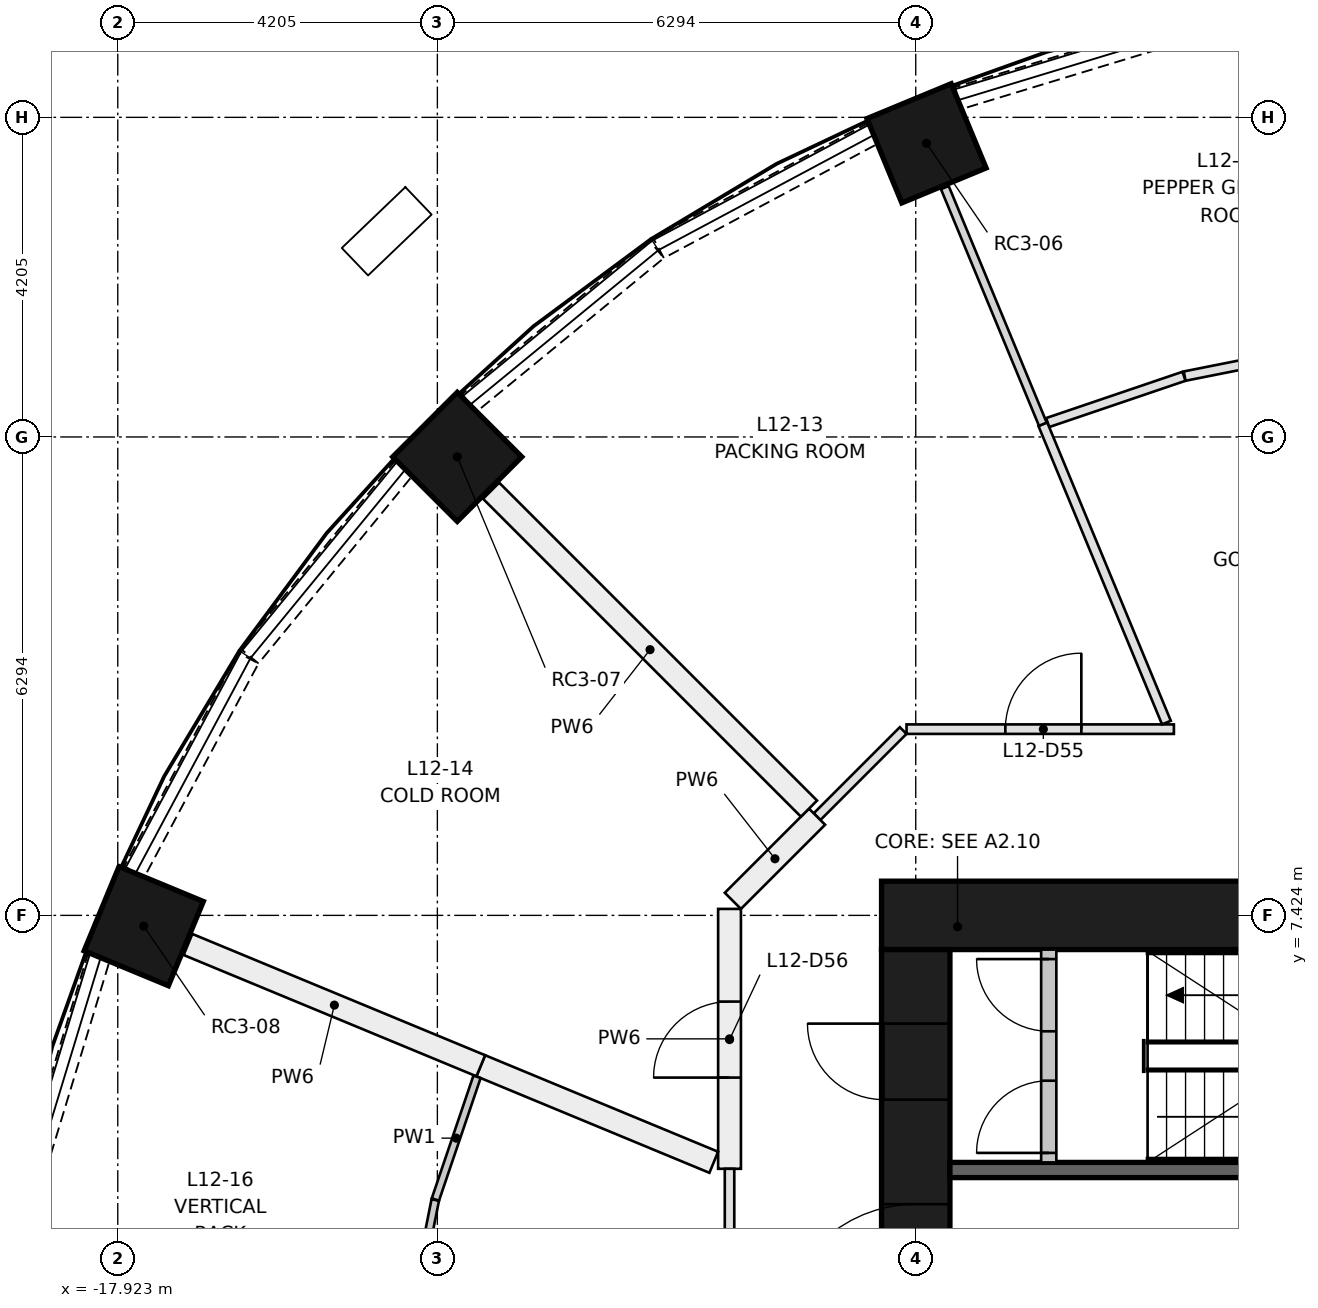
"""IFC4 building model, lengths in metres.
Left out: names, types, materials, properties, quantities, classifications, styles, units other than length and angle.
Written with IfcOpenShell. Run it as: python <this file> out.ifc"""

import sys

from ifc_helpers import new_model, si_unit, direction, frame, frame_2d, origin, origin_2d, place, context, subcontext, project, spatial, rectangle, extrude, element, fill, save


model = new_model("IFC4")
c1 = context("Model", 3, precision=1e-05, world=origin(), true_north=direction((0.0, 1.0)))
c2 = subcontext(c1, "Body", "Model", "MODEL_VIEW")
j1 = project(units=[si_unit("LENGTHUNIT", "METRE"), si_unit("PLANEANGLEUNIT", "RADIAN")], contexts=[c1])
p1 = place(None, origin())
s1 = spatial("IfcSite", under=j1, at=p1, CompositionType="ELEMENT")
p2 = place(p1, origin())
s2 = spatial("IfcBuilding", under=s1, at=p2, CompositionType="ELEMENT")
p3 = place(p2, frame((0.0, 0.0, 48.1)))
s3 = spatial("IfcBuildingStorey", under=s2, at=p3, CompositionType="ELEMENT", Elevation=48.1)
for number, where, z_axis, x_axis in (
    (1, (-7.282, 17.582, 0.0), (0.0, 0.0, 1.0), (-0.383, 0.924, 0.0)),
    (2, (-13.456, 13.456, 0.0), (0.0, 0.0, 1.0), (-0.707, 0.707, 0.0)),
    (3, (-17.582, 7.282, 0.0), (0.0, 0.0, 1.0), (-0.924, 0.383, 0.0)),
):
    element("IfcColumn", number, at=place(p3, frame(where, z_axis=z_axis, x_axis=x_axis)), inside=s3, PredefinedType="COLUMN", context=c2, shape_type="SweptSolid", body=[
        extrude(rectangle(XDim=1.2, YDim=1.2, at=origin_2d()), origin(), (0.0, 0.0, 1.0), 3.65),
    ])
p4 = place(p3, frame((-7.874, 7.424, 0.0), z_axis=(0.0, 0.0, 1.0), x_axis=(1.0, 0.0, 0.0)))
e4 = element("IfcWall", 4, at=p4, inside=s3, PredefinedType="SHEAR", context=c2, shape_type="SweptSolid", body=[
    extrude(rectangle(XDim=15.748, YDim=0.9, at=frame_2d((7.874, 0.0))), origin(), (0.0, 0.0, 1.0), 3.65),
])
p5 = place(p3, frame((-7.424, -6.974, 0.0), z_axis=(0.0, 0.0, 1.0), x_axis=(0.0, 1.0, 0.0)))
e5 = element("IfcWall", 5, at=p5, inside=s3, PredefinedType="SHEAR", context=c2, shape_type="SweptSolid", body=[
    extrude(rectangle(XDim=13.948, YDim=0.9, at=frame_2d((6.974, 0.0))), origin(), (0.0, 0.0, 1.0), 3.65),
])
p6 = place(p5, frame((6.474, 0.0, 0.0)))
e6 = element("IfcOpeningElement", 6, at=p6, cuts=e5, PredefinedType="OPENING", context=c2, shape_type="SweptSolid", body=[
    extrude(rectangle(XDim=1.0, YDim=2.1, at=frame_2d((0.5, 1.05))), frame((0.0, 0.46, 0.0), z_axis=(0.0, -1.0, 0.0), x_axis=(1.0, 0.0, 0.0)), (0.0, 0.0, 1.0), 0.92),
])
p7 = place(p5, frame((3.35, 0.0, 0.0)))
e7 = element("IfcOpeningElement", 7, at=p7, cuts=e5, PredefinedType="OPENING", context=c2, shape_type="SweptSolid", body=[
    extrude(rectangle(XDim=1.8, YDim=2.1, at=frame_2d((0.9, 1.05))), frame((0.0, 0.46, 0.0), z_axis=(0.0, -1.0, 0.0), x_axis=(1.0, 0.0, 0.0)), (0.0, 0.0, 1.0), 0.92),
])
p8 = place(p5, frame((8.799, 0.0, 0.0)))
e8 = element("IfcOpeningElement", 8, at=p8, cuts=e5, PredefinedType="OPENING", context=c2, shape_type="SweptSolid", body=[
    extrude(rectangle(XDim=1.8, YDim=2.1, at=frame_2d((0.9, 1.05))), frame((0.0, 0.46, 0.0), z_axis=(0.0, -1.0, 0.0), x_axis=(1.0, 0.0, 0.0)), (0.0, 0.0, 1.0), 0.92),
])
p9 = place(p5, frame((11.974, 0.0, 0.0)))
e9 = element("IfcOpeningElement", 9, at=p9, cuts=e5, PredefinedType="OPENING", context=c2, shape_type="SweptSolid", body=[
    extrude(rectangle(XDim=1.0, YDim=2.1, at=frame_2d((0.5, 1.05))), frame((0.0, 0.46, 0.0), z_axis=(0.0, -1.0, 0.0), x_axis=(1.0, 0.0, 0.0)), (0.0, 0.0, 1.0), 0.92),
])
p10 = place(p3, frame((-6.974, 4.074, 0.0), z_axis=(0.0, 0.0, 1.0), x_axis=(1.0, 0.0, 0.0)))
e10 = element("IfcWall", 10, at=p10, inside=s3, PredefinedType="SHEAR", context=c2, shape_type="SweptSolid", body=[
    extrude(rectangle(XDim=6.974, YDim=0.2, at=frame_2d((3.487, 0.0))), origin(), (0.0, 0.0, 1.0), 3.3),
])
p11 = place(p3, frame((-5.674, 4.174, 0.0), z_axis=(0.0, 0.0, 1.0), x_axis=(0.0, 1.0, 0.0)))
e11 = element("IfcWall", 11, at=p11, inside=s3, PredefinedType="PARTITIONING", context=c2, shape_type="SweptSolid", body=[
    extrude(rectangle(XDim=2.8, YDim=0.2, at=frame_2d((1.4, 0.0))), origin(), (0.0, 0.0, 1.0), 3.3),
])
p12 = place(p11, frame((0.125, 0.0, 0.0)))
e12 = element("IfcOpeningElement", 12, at=p12, cuts=e11, PredefinedType="OPENING", context=c2, shape_type="SweptSolid", body=[
    extrude(rectangle(XDim=0.95, YDim=2.1, at=frame_2d((0.475, 1.05))), frame((0.0, 0.11, 0.0), z_axis=(0.0, -1.0, 0.0), x_axis=(1.0, 0.0, 0.0)), (0.0, 0.0, 1.0), 0.22),
])
p13 = place(p11, frame((1.725, 0.0, 0.0)))
e13 = element("IfcOpeningElement", 13, at=p13, cuts=e11, PredefinedType="OPENING", context=c2, shape_type="SweptSolid", body=[
    extrude(rectangle(XDim=0.95, YDim=2.1, at=frame_2d((0.475, 1.05))), frame((0.0, 0.11, 0.0), z_axis=(0.0, -1.0, 0.0), x_axis=(1.0, 0.0, 0.0)), (0.0, 0.0, 1.0), 0.22),
])
p14 = place(p3, frame((-3.814, 19.102, 0.0), z_axis=(0.0, 0.0, 1.0), x_axis=(-0.956849017819, -0.290585541792, 0.0)))
e14 = element("IfcWall", 14, at=p14, inside=s3, PredefinedType="SOLIDWALL", context=c2, shape_type="SweptSolid", body=[
    extrude(rectangle(XDim=3.188, YDim=0.3, at=frame_2d((1.594, 0.0))), origin(), (0.0, 0.0, 1.0), 0.9),
])
p15 = place(p3, frame((-7.998, 17.706, 0.0), z_axis=(0.0, 0.0, 1.0), x_axis=(-0.881994263934, -0.471260138764, 0.0)))
e15 = element("IfcWall", 15, at=p15, inside=s3, PredefinedType="SOLIDWALL", context=c2, shape_type="SweptSolid", body=[
    extrude(rectangle(XDim=3.187, YDim=0.3, at=frame_2d((1.593, 0.0))), origin(), (0.0, 0.0, 1.0), 0.9),
])
for number, where, z_axis, x_axis in (
    (16, (-10.833, 16.188, 0.0), (0.0, 0.0, 1.0), (-0.773, -0.634, 0.0)),
    (17, (-14.166, 13.298, 0.0), (0.0, 0.0, 1.0), (-0.634, -0.773, 0.0)),
):
    element("IfcWall", number, at=place(p3, frame(where, z_axis=z_axis, x_axis=x_axis)), inside=s3, PredefinedType="SOLIDWALL", context=c2, shape_type="SweptSolid", body=[
        extrude(rectangle(XDim=3.188, YDim=0.3, at=frame_2d((1.594, 0.0))), origin(), (0.0, 0.0, 1.0), 0.9),
    ])
p16 = place(p3, frame((-16.204, 10.809, 0.0), z_axis=(0.0, 0.0, 1.0), x_axis=(-0.471260138764, -0.881994263934, 0.0)))
e18 = element("IfcWall", 18, at=p16, inside=s3, PredefinedType="SOLIDWALL", context=c2, shape_type="SweptSolid", body=[
    extrude(rectangle(XDim=3.187, YDim=0.3, at=frame_2d((1.593, 0.0))), origin(), (0.0, 0.0, 1.0), 0.9),
])
p17 = place(p3, frame((-18.175, 6.865, 0.0), z_axis=(0.0, 0.0, 1.0), x_axis=(-0.290585541792, -0.956849017819, 0.0)))
e19 = element("IfcWall", 19, at=p17, inside=s3, PredefinedType="SOLIDWALL", context=c2, shape_type="SweptSolid", body=[
    extrude(rectangle(XDim=3.188, YDim=0.3, at=frame_2d((1.594, 0.0))), origin(), (0.0, 0.0, 1.0), 0.9),
])
p18 = place(p3, frame((-8.722, 8.722, 0.0), z_axis=(0.0, 0.0, 1.0), x_axis=(0.707030604857, 0.70718294931, 0.0)))
e20 = element("IfcWall", 20, at=p18, inside=s3, PredefinedType="PARTITIONING", context=c2, shape_type="SweptSolid", body=[
    extrude(rectangle(XDim=1.603, YDim=0.125, at=frame_2d((0.801, 0.0))), origin(), (0.0, 0.0, 1.0), 3.3),
])
p19 = place(p3, frame((-7.545, 9.874, 0.0), z_axis=(0.0, 0.0, 1.0), x_axis=(1.0, 0.0, 0.0)))
e21 = element("IfcWall", 21, at=p19, inside=s3, PredefinedType="PARTITIONING", context=c2, shape_type="SweptSolid", body=[
    extrude(rectangle(XDim=3.518, YDim=0.125, at=frame_2d((1.759, 0.0))), origin(), (0.0, 0.0, 1.0), 3.3),
])
p20 = place(p19, frame((1.3, 0.0, 0.0)))
e22 = element("IfcOpeningElement", 22, at=p20, cuts=e21, PredefinedType="OPENING", context=c2, shape_type="SweptSolid", body=[
    extrude(rectangle(XDim=1.0, YDim=2.1, at=frame_2d((0.5, 1.05))), frame((0.0, 0.073, 0.0), z_axis=(0.0, -1.0, 0.0), x_axis=(1.0, 0.0, 0.0)), (0.0, 0.0, 1.0), 0.145),
])
p21 = place(p3, frame((-9.874, 4.09, 0.0), z_axis=(0.0, 0.0, 1.0), x_axis=(0.0, 1.0, 0.0)))
e23 = element("IfcWall", 23, at=p21, inside=s3, PredefinedType="PARTITIONING", context=c2, shape_type="SweptSolid", body=[
    extrude(rectangle(XDim=3.419, YDim=0.3, at=frame_2d((1.709, 0.0))), origin(), (0.0, 0.0, 1.0), 3.3),
])
p22 = place(p21, frame((1.2, 0.0, 0.0)))
e24 = element("IfcOpeningElement", 24, at=p22, cuts=e23, PredefinedType="OPENING", context=c2, shape_type="SweptSolid", body=[
    extrude(rectangle(XDim=1.0, YDim=2.1, at=frame_2d((0.5, 1.05))), frame((0.0, 0.16, 0.0), z_axis=(0.0, -1.0, 0.0), x_axis=(1.0, 0.0, 0.0)), (0.0, 0.0, 1.0), 0.32),
])
p23 = place(p3, frame((-9.83, 7.615, 0.0), z_axis=(0.0, 0.0, 1.0), x_axis=(0.70718471217, 0.707028841614, 0.0)))
e25 = element("IfcWall", 25, at=p23, inside=s3, PredefinedType="PARTITIONING", context=c2, shape_type="SweptSolid", body=[
    extrude(rectangle(XDim=1.566, YDim=0.3, at=frame_2d((0.783, 0.0))), origin(), (0.0, 0.0, 1.0), 3.3),
])
p24 = place(p3, frame((-9.874, 0.0, 0.0), z_axis=(0.0, 0.0, 1.0), x_axis=(0.0, 1.0, 0.0)))
e26 = element("IfcWall", 26, at=p24, inside=s3, PredefinedType="PARTITIONING", context=c2, shape_type="SweptSolid", body=[
    extrude(rectangle(XDim=4.09, YDim=0.125, at=frame_2d((2.045, 0.0))), origin(), (0.0, 0.0, 1.0), 3.3),
])
p25 = place(p24, frame((1.5, 0.0, 0.0)))
e27 = element("IfcOpeningElement", 27, at=p25, cuts=e26, PredefinedType="OPENING", context=c2, shape_type="SweptSolid", body=[
    extrude(rectangle(XDim=1.0, YDim=2.1, at=frame_2d((0.5, 1.05))), frame((0.0, 0.073, 0.0), z_axis=(0.0, -1.0, 0.0), x_axis=(1.0, 0.0, 0.0)), (0.0, 0.0, 1.0), 0.145),
])
p26 = place(p3, frame((-5.688, 13.907, 0.0), z_axis=(0.0, 0.0, 1.0), x_axis=(0.946929690395, 0.321440758848, 0.0)))
e28 = element("IfcWall", 28, at=p26, inside=s3, PredefinedType="PARTITIONING", context=c2, shape_type="SweptSolid", body=[
    extrude(rectangle(XDim=1.895, YDim=0.125, at=frame_2d((0.948, 0.0))), origin(), (0.0, 0.0, 1.0), 3.3),
])
p27 = place(p3, frame((-3.886, 14.519, 0.0), z_axis=(0.0, 0.0, 1.0), x_axis=(0.980795915473, 0.19503684829, 0.0)))
e29 = element("IfcWall", 29, at=p27, inside=s3, PredefinedType="PARTITIONING", context=c2, shape_type="SweptSolid", body=[
    extrude(rectangle(XDim=1.958, YDim=0.125, at=frame_2d((0.979, 0.0))), origin(), (0.0, 0.0, 1.0), 3.3),
])
p28 = place(p3, frame((-4.126, 9.96, 0.0), z_axis=(0.0, 0.0, 1.0), x_axis=(-0.382676572561, 0.923882373905, 0.0)))
e30 = element("IfcWall", 30, at=p28, inside=s3, PredefinedType="PARTITIONING", context=c2, shape_type="SweptSolid", body=[
    extrude(rectangle(XDim=4.249, YDim=0.125, at=frame_2d((2.125, 0.0))), origin(), (0.0, 0.0, 1.0), 3.3),
])
p29 = place(p3, frame((-5.752, 13.886, 0.0), z_axis=(0.0, 0.0, 1.0), x_axis=(-0.382716478617, 0.923865843613, 0.0)))
e31 = element("IfcWall", 31, at=p29, inside=s3, PredefinedType="PARTITIONING", context=c2, shape_type="SweptSolid", body=[
    extrude(rectangle(XDim=3.37, YDim=0.11, at=frame_2d((1.685, 0.0))), origin(), (0.0, 0.0, 1.0), 3.3),
])
p30 = place(p3, frame((-8.829, 8.829, 0.0), z_axis=(0.0, 0.0, 1.0), x_axis=(-0.707106781187, 0.707106781187, 0.0)))
e32 = element("IfcWall", 32, at=p30, inside=s3, PredefinedType="PARTITIONING", context=c2, shape_type="SweptSolid", body=[
    extrude(rectangle(XDim=5.914, YDim=0.3, at=frame_2d((2.957, 0.0))), origin(), (0.0, 0.0, 1.0), 3.3),
])
p31 = place(p3, frame((-10.081, 4.176, 0.0), z_axis=(0.0, 0.0, 1.0), x_axis=(-0.923876033225, 0.382691880281, 0.0)))
e33 = element("IfcWall", 33, at=p31, inside=s3, PredefinedType="PARTITIONING", context=c2, shape_type="SweptSolid", body=[
    extrude(rectangle(XDim=3.318, YDim=0.3, at=frame_2d((1.659, 0.0))), origin(), (0.0, 0.0, 1.0), 3.3),
])
p32 = place(p3, frame((-13.147, 5.446, 0.0), z_axis=(0.0, 0.0, 1.0), x_axis=(-0.923873410436, 0.382698212028, 0.0)))
e34 = element("IfcWall", 34, at=p32, inside=s3, PredefinedType="PARTITIONING", context=c2, shape_type="SweptSolid", body=[
    extrude(rectangle(XDim=4.17, YDim=0.3, at=frame_2d((2.085, 0.0))), origin(), (0.0, 0.0, 1.0), 3.3),
])
p33 = place(p3, frame((-14.108, 1.861, 0.0), z_axis=(0.0, 0.0, 1.0), x_axis=(0.195204777565, 0.980762506836, 0.0)))
e35 = element("IfcWall", 35, at=p33, inside=s3, PredefinedType="PARTITIONING", context=c2, shape_type="SweptSolid", body=[
    extrude(rectangle(XDim=1.855, YDim=0.1, at=frame_2d((0.927, 0.0))), origin(), (0.0, 0.0, 1.0), 3.3),
])
p34 = place(p3, frame((-13.744, 3.686, 0.0), z_axis=(0.0, 0.0, 1.0), x_axis=(0.321250473512, 0.946994262532, 0.0)))
e36 = element("IfcWall", 36, at=p34, inside=s3, PredefinedType="PARTITIONING", context=c2, shape_type="SweptSolid", body=[
    extrude(rectangle(XDim=1.705, YDim=0.1, at=frame_2d((0.852, 0.0))), origin(), (0.0, 0.0, 1.0), 3.3),
])
p35 = place(p12, origin())
e37 = element("IfcDoor", 37, at=p35, inside=s3, OperationType="SINGLE_SWING_LEFT", PredefinedType="DOOR", context=c2, shape_type="SweptSolid", body=[
    extrude(rectangle(XDim=0.95, YDim=2.1, at=frame_2d((0.475, 1.05))), frame((0.0, 0.025, 0.0), z_axis=(0.0, -1.0, 0.0), x_axis=(1.0, 0.0, 0.0)), (0.0, 0.0, 1.0), 0.05),
])
fill(e12, e37)
p36 = place(p13, origin())
e38 = element("IfcDoor", 38, at=p36, inside=s3, OperationType="SINGLE_SWING_RIGHT", PredefinedType="DOOR", context=c2, shape_type="SweptSolid", body=[
    extrude(rectangle(XDim=0.95, YDim=2.1, at=frame_2d((0.475, 1.05))), frame((0.0, 0.025, 0.0), z_axis=(0.0, -1.0, 0.0), x_axis=(1.0, 0.0, 0.0)), (0.0, 0.0, 1.0), 0.05),
])
fill(e13, e38)
p37 = place(p8, origin())
e39 = element("IfcDoor", 39, at=p37, inside=s3, OperationType="DOUBLE_DOOR_SINGLE_SWING", PredefinedType="DOOR", context=c2, shape_type="SweptSolid", body=[
    extrude(rectangle(XDim=1.8, YDim=2.1, at=frame_2d((0.9, 1.05))), frame((0.0, 0.025, 0.0), z_axis=(0.0, -1.0, 0.0), x_axis=(1.0, 0.0, 0.0)), (0.0, 0.0, 1.0), 0.05),
])
fill(e8, e39)
p38 = place(p9, origin())
e40 = element("IfcDoor", 40, at=p38, inside=s3, OperationType="SINGLE_SWING_RIGHT", PredefinedType="DOOR", context=c2, shape_type="SweptSolid", body=[
    extrude(rectangle(XDim=1.0, YDim=2.1, at=frame_2d((0.5, 1.05))), frame((0.0, 0.45, 0.0), z_axis=(0.0, -1.0, 0.0), x_axis=(1.0, 0.0, 0.0)), (0.0, 0.0, 1.0), 0.05),
])
fill(e9, e40)
p39 = place(p20, origin())
e41 = element("IfcDoor", 41, at=p39, inside=s3, OperationType="SINGLE_SWING_RIGHT", PredefinedType="DOOR", context=c2, shape_type="SweptSolid", body=[
    extrude(rectangle(XDim=1.0, YDim=2.1, at=frame_2d((0.5, 1.05))), frame((0.0, 0.025, 0.0), z_axis=(0.0, -1.0, 0.0), x_axis=(1.0, 0.0, 0.0)), (0.0, 0.0, 1.0), 0.05),
])
fill(e22, e41)
p40 = place(p22, origin())
e42 = element("IfcDoor", 42, at=p40, inside=s3, OperationType="SINGLE_SWING_LEFT", PredefinedType="DOOR", context=c2, shape_type="SweptSolid", body=[
    extrude(rectangle(XDim=1.0, YDim=2.1, at=frame_2d((0.5, 1.05))), frame((0.0, 0.025, 0.0), z_axis=(0.0, -1.0, 0.0), x_axis=(1.0, 0.0, 0.0)), (0.0, 0.0, 1.0), 0.05),
])
fill(e24, e42)
save(model, sys.argv[1])
